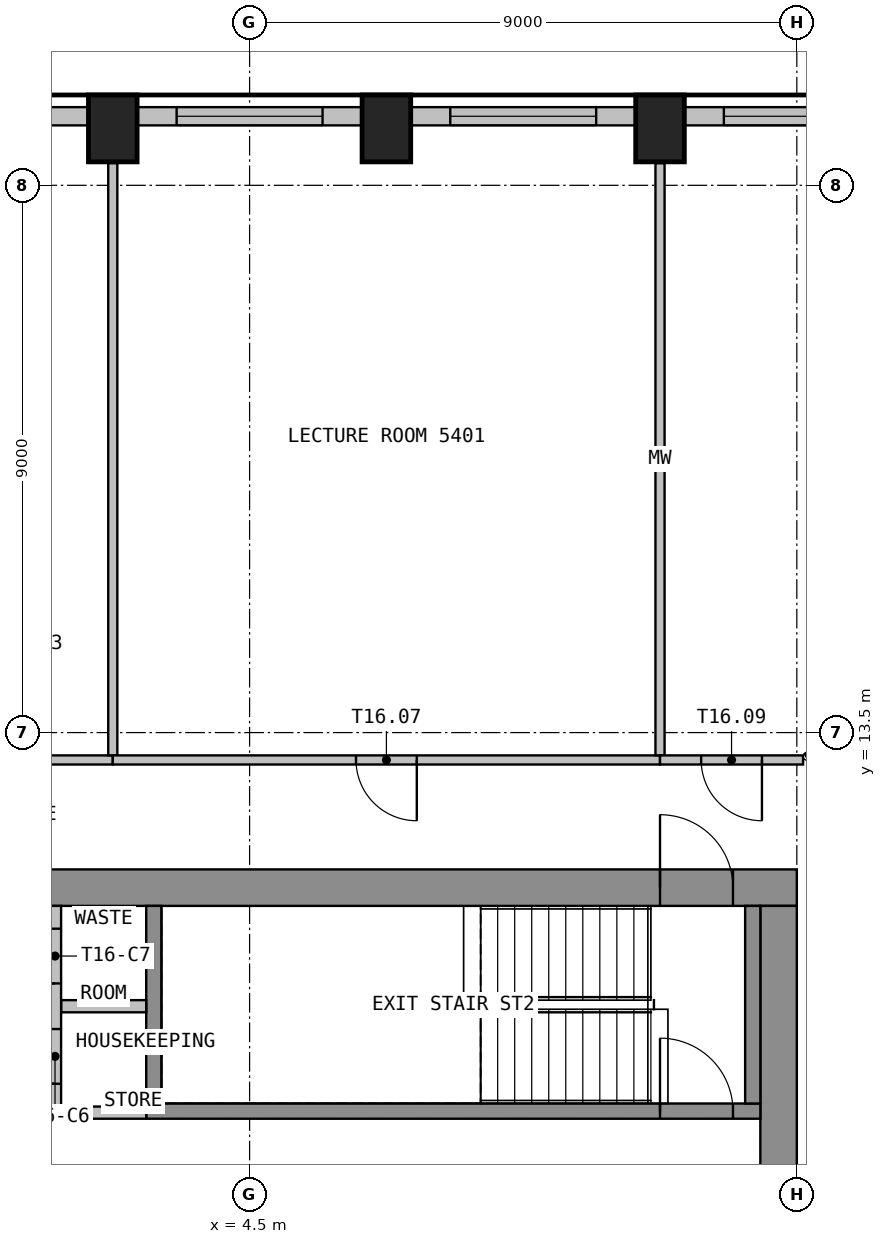
"""IFC4 building model, lengths in metres.
Left out: names, types, materials, properties, quantities, classifications, styles, units other than length and angle.
Written with IfcOpenShell. Run it as: python <this file> out.ifc"""

import sys

from ifc_helpers import new_model, si_unit, direction, frame, frame_2d, origin, origin_2d, place, context, subcontext, project, spatial, rectangle, extrude, element, fill, save


model = new_model("IFC4")
c1 = context("Model", 3, precision=1e-05, world=origin(), true_north=direction((0.0, 1.0)))
c2 = subcontext(c1, "Body", "Model", "MODEL_VIEW")
j1 = project(units=[si_unit("LENGTHUNIT", "METRE"), si_unit("PLANEANGLEUNIT", "RADIAN")], contexts=[c1])
p1 = place(None, origin())
s1 = spatial("IfcSite", under=j1, at=p1, CompositionType="ELEMENT")
p2 = place(p1, origin())
s2 = spatial("IfcBuilding", under=s1, at=p2, CompositionType="ELEMENT")
p3 = place(p2, frame((0.0, 0.0, 219.0)))
s3 = spatial("IfcBuildingStorey", under=s2, at=p3, CompositionType="ELEMENT", Elevation=219.0)
for number, where, z_axis, x_axis in (
    (1, (11.25, 23.436, 0.0), (0.0, 0.0, 1.0), (-1.0, 0.0, 0.0)),
    (2, (6.75, 23.436, 0.0), (0.0, 0.0, 1.0), (-1.0, 0.0, 0.0)),
    (3, (2.25, 23.436, 0.0), (0.0, 0.0, 1.0), (-1.0, 0.0, 0.0)),
):
    element("IfcColumn", number, at=place(p3, frame(where, z_axis=z_axis, x_axis=x_axis)), inside=s3, PredefinedType="COLUMN", context=c2, shape_type="SweptSolid", body=[
        extrude(rectangle(XDim=0.8, YDim=1.1, at=origin_2d()), origin(), (0.0, 0.0, 1.0), 3.55),
    ])
p4 = place(p3, frame((15.046, 23.635, 0.0), z_axis=(0.0, 0.0, 1.0), x_axis=(-1.0, 0.0, 0.0)))
e4 = element("IfcWall", 4, at=p4, inside=s3, PredefinedType="SOLIDWALL", context=c2, shape_type="SweptSolid", body=[
    extrude(rectangle(XDim=3.396, YDim=0.3, at=frame_2d((1.698, 0.0))), origin(), (0.0, 0.0, 1.0), 3.55),
])
p5 = place(p4, frame((0.346, 0.0, 0.9)))
e5 = element("IfcOpeningElement", 5, at=p5, cuts=e4, PredefinedType="OPENING", context=c2, shape_type="SweptSolid", body=[
    extrude(rectangle(XDim=2.4, YDim=2.1, at=frame_2d((1.2, 1.05))), frame((0.0, 0.16, 0.0), z_axis=(0.0, -1.0, 0.0), x_axis=(1.0, 0.0, 0.0)), (0.0, 0.0, 1.0), 0.32),
])
p6 = place(p3, frame((10.85, 23.635, 0.0), z_axis=(0.0, 0.0, 1.0), x_axis=(-1.0, 0.0, 0.0)))
e6 = element("IfcWall", 6, at=p6, inside=s3, PredefinedType="SOLIDWALL", context=c2, shape_type="SweptSolid", body=[
    extrude(rectangle(XDim=3.699, YDim=0.3, at=frame_2d((1.85, 0.0))), origin(), (0.0, 0.0, 1.0), 3.55),
])
p7 = place(p6, frame((0.649, 0.0, 0.9)))
e7 = element("IfcOpeningElement", 7, at=p7, cuts=e6, PredefinedType="OPENING", context=c2, shape_type="SweptSolid", body=[
    extrude(rectangle(XDim=2.4, YDim=2.1, at=frame_2d((1.2, 1.05))), frame((0.0, 0.16, 0.0), z_axis=(0.0, -1.0, 0.0), x_axis=(1.0, 0.0, 0.0)), (0.0, 0.0, 1.0), 0.32),
])
p8 = place(p3, frame((6.35, 23.635, 0.0), z_axis=(0.0, 0.0, 1.0), x_axis=(-1.0, 0.0, 0.0)))
e8 = element("IfcWall", 8, at=p8, inside=s3, PredefinedType="SOLIDWALL", context=c2, shape_type="SweptSolid", body=[
    extrude(rectangle(XDim=3.699, YDim=0.3, at=frame_2d((1.85, 0.0))), origin(), (0.0, 0.0, 1.0), 3.55),
])
p9 = place(p8, frame((0.649, 0.0, 0.9)))
e9 = element("IfcOpeningElement", 9, at=p9, cuts=e8, PredefinedType="OPENING", context=c2, shape_type="SweptSolid", body=[
    extrude(rectangle(XDim=2.4, YDim=2.1, at=frame_2d((1.2, 1.05))), frame((0.0, 0.16, 0.0), z_axis=(0.0, -1.0, 0.0), x_axis=(1.0, 0.0, 0.0)), (0.0, 0.0, 1.0), 0.32),
])
p10 = place(p3, frame((1.85, 23.635, 0.0), z_axis=(0.0, 0.0, 1.0), x_axis=(-1.0, 0.0, 0.0)))
e10 = element("IfcWall", 10, at=p10, inside=s3, PredefinedType="SOLIDWALL", context=c2, shape_type="SweptSolid", body=[
    extrude(rectangle(XDim=3.699, YDim=0.3, at=frame_2d((1.85, 0.0))), origin(), (0.0, 0.0, 1.0), 3.55),
])
p11 = place(p10, frame((0.649, 0.0, 0.9)))
e11 = element("IfcOpeningElement", 11, at=p11, cuts=e10, PredefinedType="OPENING", context=c2, shape_type="SweptSolid", body=[
    extrude(rectangle(XDim=2.4, YDim=2.1, at=frame_2d((1.2, 1.05))), frame((0.0, 0.16, 0.0), z_axis=(0.0, -1.0, 0.0), x_axis=(1.0, 0.0, 0.0)), (0.0, 0.0, 1.0), 0.32),
])
p12 = place(p3, frame((-13.5, 10.95, 0.0), z_axis=(0.0, 0.0, 1.0), x_axis=(1.0, 0.0, 0.0)))
e12 = element("IfcWall", 12, at=p12, inside=s3, PredefinedType="SHEAR", context=c2, shape_type="SweptSolid", body=[
    extrude(rectangle(XDim=27.0, YDim=0.6, at=frame_2d((13.5, 0.0))), origin(), (0.0, 0.0, 1.0), 3.55),
])
p13 = place(p12, frame((12.3, 0.0, 0.0)))
e13 = element("IfcOpeningElement", 13, at=p13, cuts=e12, PredefinedType="OPENING", context=c2, shape_type="SweptSolid", body=[
    extrude(rectangle(XDim=2.4, YDim=2.1, at=frame_2d((1.2, 1.05))), frame((0.0, 0.31, 0.0), z_axis=(0.0, -1.0, 0.0), x_axis=(1.0, 0.0, 0.0)), (0.0, 0.0, 1.0), 0.62),
])
p14 = place(p12, frame((1.05, 0.0, 0.0)))
e14 = element("IfcOpeningElement", 14, at=p14, cuts=e12, PredefinedType="OPENING", context=c2, shape_type="SweptSolid", body=[
    extrude(rectangle(XDim=1.2, YDim=2.1, at=frame_2d((0.6, 1.05))), frame((0.0, 0.31, 0.0), z_axis=(0.0, -1.0, 0.0), x_axis=(1.0, 0.0, 0.0)), (0.0, 0.0, 1.0), 0.62),
])
p15 = place(p12, frame((24.75, 0.0, 0.0)))
e15 = element("IfcOpeningElement", 15, at=p15, cuts=e12, PredefinedType="OPENING", context=c2, shape_type="SweptSolid", body=[
    extrude(rectangle(XDim=1.2, YDim=2.1, at=frame_2d((0.6, 1.05))), frame((0.0, 0.31, 0.0), z_axis=(0.0, -1.0, 0.0), x_axis=(1.0, 0.0, 0.0)), (0.0, 0.0, 1.0), 0.62),
])
p16 = place(p3, frame((13.2, -10.65, 0.0), z_axis=(0.0, 0.0, 1.0), x_axis=(0.0, 1.0, 0.0)))
e16 = element("IfcWall", 16, at=p16, inside=s3, PredefinedType="SHEAR", context=c2, shape_type="SweptSolid", body=[
    extrude(rectangle(XDim=21.3, YDim=0.6, at=frame_2d((10.65, 0.0))), origin(), (0.0, 0.0, 1.0), 3.55),
])
p17 = place(p16, frame((9.45, 0.0, 0.0)))
e17 = element("IfcOpeningElement", 17, at=p17, cuts=e16, PredefinedType="OPENING", context=c2, shape_type="SweptSolid", body=[
    extrude(rectangle(XDim=2.4, YDim=2.1, at=frame_2d((1.2, 1.05))), frame((0.0, 0.31, 0.0), z_axis=(0.0, -1.0, 0.0), x_axis=(1.0, 0.0, 0.0)), (0.0, 0.0, 1.0), 0.62),
])
p18 = place(p3, frame((2.8, 7.275, 0.0), z_axis=(0.0, 0.0, 1.0), x_axis=(1.0, 0.0, 0.0)))
e18 = element("IfcWall", 18, at=p18, inside=s3, PredefinedType="SHEAR", context=c2, shape_type="SweptSolid", body=[
    extrude(rectangle(XDim=10.1, YDim=0.25, at=frame_2d((5.05, 0.0))), origin(), (0.0, 0.0, 1.0), 3.55),
])
p19 = place(p18, frame((8.45, 0.0, 0.0)))
e19 = element("IfcOpeningElement", 19, at=p19, cuts=e18, PredefinedType="OPENING", context=c2, shape_type="SweptSolid", body=[
    extrude(rectangle(XDim=1.2, YDim=2.1, at=frame_2d((0.6, 1.05))), frame((0.0, 0.135, 0.0), z_axis=(0.0, -1.0, 0.0), x_axis=(1.0, 0.0, 0.0)), (0.0, 0.0, 1.0), 0.27),
])
for number, where, z_axis, x_axis in (
    (20, (2.925, 7.4, 0.0), (0.0, 0.0, 1.0), (0.0, 1.0, 0.0)),
    (21, (12.775, 7.4, 0.0), (0.0, 0.0, 1.0), (0.0, 1.0, 0.0)),
):
    element("IfcWall", number, at=place(p3, frame(where, z_axis=z_axis, x_axis=x_axis)), inside=s3, PredefinedType="SHEAR", context=c2, shape_type="SweptSolid", body=[
        extrude(rectangle(XDim=3.25, YDim=0.25, at=frame_2d((1.625, 0.0))), origin(), (0.0, 0.0, 1.0), 3.55),
    ])
for number, where, z_axis, x_axis in (
    (22, (1.4, 7.25, 0.0), (0.0, 0.0, 1.0), (1.0, 0.0, 0.0)),
    (23, (1.4, 9.0, 0.0), (0.0, 0.0, 1.0), (1.0, 0.0, 0.0)),
):
    element("IfcWall", number, at=place(p3, frame(where, z_axis=z_axis, x_axis=x_axis)), inside=s3, PredefinedType="PARTITIONING", context=c2, shape_type="SweptSolid", body=[
        extrude(rectangle(XDim=1.4, YDim=0.2, at=frame_2d((0.7, 0.0))), origin(), (0.0, 0.0, 1.0), 3.55),
    ])
p20 = place(p3, frame((1.3, 7.15, 0.0), z_axis=(0.0, 0.0, 1.0), x_axis=(0.0, 1.0, 0.0)))
e24 = element("IfcWall", 24, at=p20, inside=s3, PredefinedType="PARTITIONING", context=c2, shape_type="SweptSolid", body=[
    extrude(rectangle(XDim=3.5, YDim=0.2, at=frame_2d((1.75, 0.0))), origin(), (0.0, 0.0, 1.0), 3.55),
])
p21 = place(p20, frame((0.575, 0.0, 0.0)))
e25 = element("IfcOpeningElement", 25, at=p21, cuts=e24, PredefinedType="OPENING", context=c2, shape_type="SweptSolid", body=[
    extrude(rectangle(XDim=0.9, YDim=2.1, at=frame_2d((0.45, 1.05))), frame((0.0, 0.11, 0.0), z_axis=(0.0, -1.0, 0.0), x_axis=(1.0, 0.0, 0.0)), (0.0, 0.0, 1.0), 0.22),
])
p22 = place(p20, frame((2.225, 0.0, 0.0)))
e26 = element("IfcOpeningElement", 26, at=p22, cuts=e24, PredefinedType="OPENING", context=c2, shape_type="SweptSolid", body=[
    extrude(rectangle(XDim=0.9, YDim=2.1, at=frame_2d((0.45, 1.05))), frame((0.0, 0.11, 0.0), z_axis=(0.0, -1.0, 0.0), x_axis=(1.0, 0.0, 0.0)), (0.0, 0.0, 1.0), 0.22),
])
p23 = place(p3, frame((2.25, 13.05, 0.0), z_axis=(0.0, 0.0, 1.0), x_axis=(-1.0, 0.0, 0.0)))
e27 = element("IfcWall", 27, at=p23, inside=s3, PredefinedType="PARTITIONING", context=c2, shape_type="SweptSolid", body=[
    extrude(rectangle(XDim=15.853, YDim=0.15, at=frame_2d((7.927, 0.0))), origin(), (0.0, 0.0, 1.0), 3.55),
])
p24 = place(p23, frame((7.427, 0.0, 0.0)))
e28 = element("IfcOpeningElement", 28, at=p24, cuts=e27, PredefinedType="OPENING", context=c2, shape_type="SweptSolid", body=[
    extrude(rectangle(XDim=1.0, YDim=2.1, at=frame_2d((0.5, 1.05))), frame((0.0, 0.085, 0.0), z_axis=(0.0, -1.0, 0.0), x_axis=(1.0, 0.0, 0.0)), (0.0, 0.0, 1.0), 0.17),
])
p25 = place(p3, frame((2.25, 22.865, 0.0), z_axis=(0.0, 0.0, 1.0), x_axis=(0.0, -1.0, 0.0)))
e29 = element("IfcWall", 29, at=p25, inside=s3, PredefinedType="PARTITIONING", context=c2, shape_type="SweptSolid", body=[
    extrude(rectangle(XDim=9.74, YDim=0.15, at=frame_2d((4.87, 0.0))), origin(), (0.0, 0.0, 1.0), 3.55),
])
p26 = place(p3, frame((11.25, 13.05, 0.0), z_axis=(0.0, 0.0, 1.0), x_axis=(-1.0, 0.0, 0.0)))
e30 = element("IfcWall", 30, at=p26, inside=s3, PredefinedType="PARTITIONING", context=c2, shape_type="SweptSolid", body=[
    extrude(rectangle(XDim=9.0, YDim=0.15, at=frame_2d((4.5, 0.0))), origin(), (0.0, 0.0, 1.0), 3.55),
])
p27 = place(p26, frame((4.0, 0.0, 0.0)))
e31 = element("IfcOpeningElement", 31, at=p27, cuts=e30, PredefinedType="OPENING", context=c2, shape_type="SweptSolid", body=[
    extrude(rectangle(XDim=1.0, YDim=2.1, at=frame_2d((0.5, 1.05))), frame((0.0, 0.085, 0.0), z_axis=(0.0, -1.0, 0.0), x_axis=(1.0, 0.0, 0.0)), (0.0, 0.0, 1.0), 0.17),
])
p28 = place(p3, frame((11.25, 22.865, 0.0), z_axis=(0.0, 0.0, 1.0), x_axis=(0.0, -1.0, 0.0)))
e32 = element("IfcWall", 32, at=p28, inside=s3, PredefinedType="MOVABLE", context=c2, shape_type="SweptSolid", body=[
    extrude(rectangle(XDim=9.74, YDim=0.15, at=frame_2d((4.87, 0.0))), origin(), (0.0, 0.0, 1.0), 3.55),
])
p29 = place(p3, frame((13.603, 13.05, 0.0), z_axis=(0.0, 0.0, 1.0), x_axis=(-1.0, 0.0, 0.0)))
e33 = element("IfcWall", 33, at=p29, inside=s3, PredefinedType="PARTITIONING", context=c2, shape_type="SweptSolid", body=[
    extrude(rectangle(XDim=2.353, YDim=0.15, at=frame_2d((1.177, 0.0))), origin(), (0.0, 0.0, 1.0), 3.55),
])
p30 = place(p29, frame((0.677, 0.0, 0.0)))
e34 = element("IfcOpeningElement", 34, at=p30, cuts=e33, PredefinedType="OPENING", context=c2, shape_type="SweptSolid", body=[
    extrude(rectangle(XDim=1.0, YDim=2.1, at=frame_2d((0.5, 1.05))), frame((0.0, 0.085, 0.0), z_axis=(0.0, -1.0, 0.0), x_axis=(1.0, 0.0, 0.0)), (0.0, 0.0, 1.0), 0.17),
])
p31 = place(p3, frame((19.688, 16.563, 0.0), z_axis=(0.0, 0.0, 1.0), x_axis=(-0.866012448988, -0.500022437694, 0.0)))
e35 = element("IfcWall", 35, at=p31, inside=s3, PredefinedType="PARTITIONING", context=c2, shape_type="SweptSolid", body=[
    extrude(rectangle(XDim=6.951, YDim=0.15, at=frame_2d((3.476, 0.0))), origin(), (0.0, 0.0, 1.0), 3.55),
])
p32 = place(p5, origin())
e36 = element("IfcWindow", 36, at=p32, inside=s3, PartitioningType="SINGLE_PANEL", PredefinedType="WINDOW", context=c2, shape_type="SweptSolid", body=[
    extrude(rectangle(XDim=2.4, YDim=2.1, at=frame_2d((1.2, 1.05))), frame((0.0, 0.03, 0.0), z_axis=(0.0, -1.0, 0.0), x_axis=(1.0, 0.0, 0.0)), (0.0, 0.0, 1.0), 0.06),
])
fill(e5, e36)
p33 = place(p7, origin())
e37 = element("IfcWindow", 37, at=p33, inside=s3, PartitioningType="SINGLE_PANEL", PredefinedType="WINDOW", context=c2, shape_type="SweptSolid", body=[
    extrude(rectangle(XDim=2.4, YDim=2.1, at=frame_2d((1.2, 1.05))), frame((0.0, 0.03, 0.0), z_axis=(0.0, -1.0, 0.0), x_axis=(1.0, 0.0, 0.0)), (0.0, 0.0, 1.0), 0.06),
])
fill(e7, e37)
p34 = place(p9, origin())
e38 = element("IfcWindow", 38, at=p34, inside=s3, PartitioningType="SINGLE_PANEL", PredefinedType="WINDOW", context=c2, shape_type="SweptSolid", body=[
    extrude(rectangle(XDim=2.4, YDim=2.1, at=frame_2d((1.2, 1.05))), frame((0.0, 0.03, 0.0), z_axis=(0.0, -1.0, 0.0), x_axis=(1.0, 0.0, 0.0)), (0.0, 0.0, 1.0), 0.06),
])
fill(e9, e38)
p35 = place(p15, origin())
e39 = element("IfcDoor", 39, at=p35, inside=s3, OperationType="SINGLE_SWING_RIGHT", PredefinedType="DOOR", context=c2, shape_type="SweptSolid", body=[
    extrude(rectangle(XDim=1.2, YDim=2.1, at=frame_2d((0.6, 1.05))), frame((0.0, 0.025, 0.0), z_axis=(0.0, -1.0, 0.0), x_axis=(1.0, 0.0, 0.0)), (0.0, 0.0, 1.0), 0.05),
])
fill(e15, e39)
p36 = place(p19, origin())
e40 = element("IfcDoor", 40, at=p36, inside=s3, OperationType="SINGLE_SWING_LEFT", PredefinedType="DOOR", context=c2, shape_type="SweptSolid", body=[
    extrude(rectangle(XDim=1.2, YDim=2.1, at=frame_2d((0.6, 1.05))), frame((0.0, 0.025, 0.0), z_axis=(0.0, -1.0, 0.0), x_axis=(1.0, 0.0, 0.0)), (0.0, 0.0, 1.0), 0.05),
])
fill(e19, e40)
p37 = place(p21, origin())
e41 = element("IfcDoor", 41, at=p37, inside=s3, OperationType="SINGLE_SWING_LEFT", PredefinedType="DOOR", context=c2, shape_type="SweptSolid", body=[
    extrude(rectangle(XDim=0.9, YDim=2.1, at=frame_2d((0.45, 1.05))), frame((0.0, 0.025, 0.0), z_axis=(0.0, -1.0, 0.0), x_axis=(1.0, 0.0, 0.0)), (0.0, 0.0, 1.0), 0.05),
])
fill(e25, e41)
p38 = place(p22, origin())
e42 = element("IfcDoor", 42, at=p38, inside=s3, OperationType="SINGLE_SWING_LEFT", PredefinedType="DOOR", context=c2, shape_type="SweptSolid", body=[
    extrude(rectangle(XDim=0.9, YDim=2.1, at=frame_2d((0.45, 1.05))), frame((0.0, 0.025, 0.0), z_axis=(0.0, -1.0, 0.0), x_axis=(1.0, 0.0, 0.0)), (0.0, 0.0, 1.0), 0.05),
])
fill(e26, e42)
p39 = place(p27, origin())
e43 = element("IfcDoor", 43, at=p39, inside=s3, OperationType="SINGLE_SWING_LEFT", PredefinedType="DOOR", context=c2, shape_type="SweptSolid", body=[
    extrude(rectangle(XDim=1.0, YDim=2.1, at=frame_2d((0.5, 1.05))), frame((0.0, 0.025, 0.0), z_axis=(0.0, -1.0, 0.0), x_axis=(1.0, 0.0, 0.0)), (0.0, 0.0, 1.0), 0.05),
])
fill(e31, e43)
p40 = place(p30, origin())
e44 = element("IfcDoor", 44, at=p40, inside=s3, OperationType="SINGLE_SWING_LEFT", PredefinedType="DOOR", context=c2, shape_type="SweptSolid", body=[
    extrude(rectangle(XDim=1.0, YDim=2.1, at=frame_2d((0.5, 1.05))), frame((0.0, 0.025, 0.0), z_axis=(0.0, -1.0, 0.0), x_axis=(1.0, 0.0, 0.0)), (0.0, 0.0, 1.0), 0.05),
])
fill(e34, e44)
save(model, sys.argv[1])
